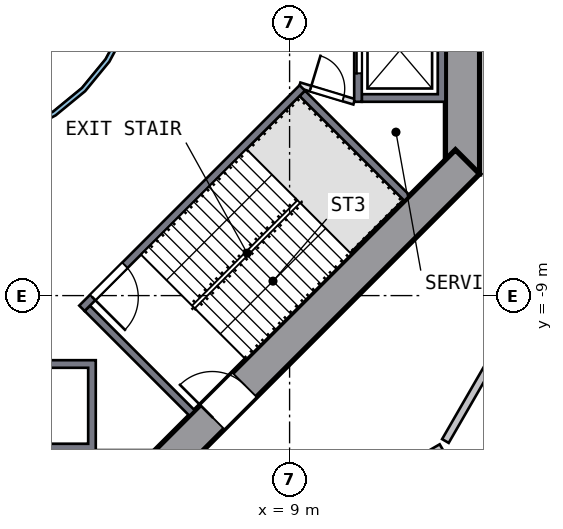
"""IFC4 building model, lengths in metres.
Left out: names, types, materials, properties, quantities, classifications, styles, units other than length and angle.
Written with IfcOpenShell. Run it as: python <this file> out.ifc"""

import sys

from ifc_helpers import new_model, si_unit, direction, frame, frame_2d, origin, place, context, subcontext, project, spatial, polyline, rectangle, outline, extrude, element, fill, save


model = new_model("IFC4")
c1 = context("Model", 3, precision=1e-05, world=origin(), true_north=direction((0.0, 1.0)))
c2 = subcontext(c1, "Body", "Model", "MODEL_VIEW")
j1 = project(units=[si_unit("LENGTHUNIT", "METRE"), si_unit("PLANEANGLEUNIT", "RADIAN")], contexts=[c1])
p1 = place(None, origin())
s1 = spatial("IfcSite", under=j1, at=p1, CompositionType="ELEMENT")
p2 = place(p1, origin())
s2 = spatial("IfcBuilding", under=s1, at=p2, CompositionType="ELEMENT")
p3 = place(p2, frame((0.0, 0.0, 34.0)))
s3 = spatial("IfcBuildingStorey", under=s2, at=p3, CompositionType="ELEMENT", Elevation=34.0)
p4 = place(p3, frame((13.55, -5.799, 0.0), z_axis=(0.0, 0.0, 1.0), x_axis=(0.0, 1.0, 0.0)))
e1 = element("IfcWall", 1, at=p4, inside=s3, PredefinedType="SHEAR", context=c2, shape_type="SweptSolid", body=[
    extrude(rectangle(XDim=11.598, YDim=0.9, at=frame_2d((5.799, 0.0))), origin(), (0.0, 0.0, 1.0), 5.0),
])
p5 = place(p4, frame((4.899, 0.0, 0.0)))
e2 = element("IfcOpeningElement", 2, at=p5, cuts=e1, PredefinedType="OPENING", context=c2, shape_type="SweptSolid", body=[
    extrude(rectangle(XDim=1.8, YDim=2.1, at=frame_2d((0.9, 1.05))), frame((0.0, 0.46, 0.0), z_axis=(0.0, -1.0, 0.0), x_axis=(1.0, 0.0, 0.0)), (0.0, 0.0, 1.0), 0.92),
])
p6 = place(p3, frame((5.481, -13.682, 0.0), z_axis=(0.0, 0.0, 1.0), x_axis=(0.707106781, 0.707106781, 0.0)))
e3 = element("IfcWall", 3, at=p6, inside=s3, PredefinedType="SHEAR", context=c2, shape_type="SweptSolid", body=[
    extrude(rectangle(XDim=11.598, YDim=0.9, at=frame_2d((5.799, 0.0))), origin(), (0.0, 0.0, 1.0), 5.0),
])
p7 = place(p6, frame((2.099, 0.0, 0.0)))
e4 = element("IfcOpeningElement", 4, at=p7, cuts=e3, PredefinedType="OPENING", context=c2, shape_type="SweptSolid", body=[
    extrude(rectangle(XDim=1.2, YDim=2.1, at=frame_2d((0.6, 1.05))), frame((0.0, 0.46, 0.0), z_axis=(0.0, -1.0, 0.0), x_axis=(1.0, 0.0, 0.0)), (0.0, 0.0, 1.0), 0.92),
])
p8 = place(p3, origin())
e5 = element("IfcWall", 5, at=p8, inside=s3, PredefinedType="SOLIDWALL", context=c2, shape_type="SweptSolid", body=[
    extrude(outline(polyline([(13.1, -3.9), (10.9, -3.9), (10.9, -3.7), (12.9, -3.7), (12.9, -1.4), (10.9, -1.4), (10.9, -1.2), (13.1, -1.2), (13.1, -3.9)])), origin(), (0.0, 0.0, 1.0), 4.69),
])
p9 = place(p3, frame((10.8, -1.2, 0.0), z_axis=(0.0, 0.0, 1.0), x_axis=(0.0, -1.0, 0.0)))
e6 = element("IfcWall", 6, at=p9, inside=s3, PredefinedType="SOLIDWALL", context=c2, shape_type="SweptSolid", body=[
    extrude(rectangle(XDim=2.7, YDim=0.2, at=frame_2d((1.35, 0.0))), origin(), (0.0, 0.0, 1.0), 4.69),
])
p10 = place(p9, frame((0.75, 0.0, 0.0)))
e7 = element("IfcOpeningElement", 7, at=p10, cuts=e6, PredefinedType="OPENING", context=c2, shape_type="SweptSolid", body=[
    extrude(rectangle(XDim=1.2, YDim=2.1, at=frame_2d((0.6, 1.05))), frame((0.0, 0.11, 0.0), z_axis=(0.0, -1.0, 0.0), x_axis=(1.0, 0.0, 0.0)), (0.0, 0.0, 1.0), 0.22),
])
p11 = place(p3, origin())
e8 = element("IfcWall", 8, at=p11, inside=s3, PredefinedType="SOLIDWALL", context=c2, shape_type="SweptSolid", body=[
    extrude(outline(polyline([(3.9, -10.7), (3.9, -13.1), (1.2, -13.1), (1.2, -10.7), (3.9, -10.7)]), holes=[polyline([(1.4, -12.9), (3.7, -12.9), (3.7, -10.9), (1.4, -10.9), (1.4, -12.9)])]), origin(), (0.0, 0.0, 1.0), 4.69),
])
p12 = place(p3, frame((9.334, -3.535, 0.0), z_axis=(0.0, 0.0, 1.0), x_axis=(-0.707106781, -0.707106781, 0.0)))
e9 = element("IfcWall", 9, at=p12, inside=s3, PredefinedType="SOLIDWALL", context=c2, shape_type="SweptSolid", body=[
    extrude(rectangle(XDim=8.2, YDim=0.2, at=frame_2d((4.1, 0.0))), origin(), (0.0, 0.0, 1.0), 4.69),
])
p13 = place(p12, frame((6.6, 0.0, 0.0)))
e10 = element("IfcOpeningElement", 10, at=p13, cuts=e9, PredefinedType="OPENING", context=c2, shape_type="SweptSolid", body=[
    extrude(rectangle(XDim=1.2, YDim=2.1, at=frame_2d((0.6, 1.05))), frame((0.0, 0.11, 0.0), z_axis=(0.0, -1.0, 0.0), x_axis=(1.0, 0.0, 0.0)), (0.0, 0.0, 1.0), 0.22),
])
for number, where, z_axis, x_axis in (
    (11, (3.677, -9.334, 0.0), (0.0, 0.0, 1.0), (0.707, -0.707, 0.0)),
    (12, (9.334, -3.677, 0.0), (0.0, 0.0, 1.0), (0.707, -0.707, 0.0)),
):
    element("IfcWall", number, at=place(p3, frame(where, z_axis=z_axis, x_axis=x_axis)), inside=s3, PredefinedType="SOLIDWALL", context=c2, shape_type="SweptSolid", body=[
        extrude(rectangle(XDim=3.9, YDim=0.2, at=frame_2d((1.95, 0.0))), origin(), (0.0, 0.0, 1.0), 4.69),
    ])
p14 = place(p3, frame((9.263, -3.465, 0.0), z_axis=(0.0, 0.0, 1.0), x_axis=(0.957084567, -0.289808785, 0.0)))
e13 = element("IfcWall", 13, at=p14, inside=s3, PredefinedType="PARTITIONING", context=c2, shape_type="SweptSolid", body=[
    extrude(rectangle(XDim=1.501, YDim=0.15, at=frame_2d((0.75, 0.0))), origin(), (0.0, 0.0, 1.0), 4.69),
])
p15 = place(p14, frame((0.301, 0.0, 0.0)))
e14 = element("IfcOpeningElement", 14, at=p15, cuts=e13, PredefinedType="OPENING", context=c2, shape_type="SweptSolid", body=[
    extrude(rectangle(XDim=0.9, YDim=2.1, at=frame_2d((0.45, 1.05))), frame((0.0, 0.085, 0.0), z_axis=(0.0, -1.0, 0.0), x_axis=(1.0, 0.0, 0.0)), (0.0, 0.0, 1.0), 0.17),
])
p16 = place(p3, origin())
e15 = element("IfcWall", 15, at=p16, inside=s3, PredefinedType="SOLIDWALL", context=c2, shape_type="SweptSolid", body=[
    extrude(outline(polyline([(5.021, -0.999), (4.73, -1.959), (4.257, -2.844), (3.62, -3.62), (2.844, -4.257), (1.959, -4.73), (0.999, -5.021), (0.0, -5.12), (-0.999, -5.021), (-1.959, -4.73), (-2.844, -4.257), (-3.62, -3.62), (-4.257, -2.844), (-4.73, -1.959), (-5.021, -0.999), (-5.12, 0.0), (-5.021, 0.999), (-4.73, 1.959), (-4.257, 2.844), (-3.62, 3.62), (-2.844, 4.257), (-1.959, 4.73), (-0.999, 5.021), (0.0, 5.12), (0.999, 5.021), (1.959, 4.73), (2.844, 4.257), (3.62, 3.62), (4.257, 2.844), (4.73, 1.959), (5.021, 0.999), (5.12, 0.0), (5.021, -0.999)]), holes=[polyline([(4.904, 0.976), (4.619, 1.913), (4.157, 2.778), (3.535, 3.535), (2.778, 4.157), (1.913, 4.619), (0.976, 4.904), (0.0, 5.0), (-0.976, 4.904), (-1.913, 4.619), (-2.778, 4.157), (-3.535, 3.535), (-4.157, 2.778), (-4.619, 1.913), (-4.904, 0.976), (-5.0, 0.0), (-4.904, -0.976), (-4.619, -1.913), (-4.157, -2.778), (-3.535, -3.535), (-2.778, -4.157), (-1.913, -4.619), (-0.976, -4.904), (0.0, -5.0), (0.976, -4.904), (1.913, -4.619), (2.778, -4.157), (3.535, -3.535), (4.157, -2.778), (4.619, -1.913), (4.904, -0.976), (5.0, 0.0), (4.904, 0.976)])]), origin(), (0.0, 0.0, 1.0), 4.69),
])
p17 = place(p3, frame((13.0, -13.0, 0.0), z_axis=(0.0, 0.0, 1.0), x_axis=(-0.866021935, -0.500006007, 0.0)))
e16 = element("IfcWall", 16, at=p17, inside=s3, PredefinedType="SOLIDWALL", context=c2, shape_type="SweptSolid", body=[
    extrude(rectangle(XDim=9.316, YDim=0.2, at=frame_2d((4.658, 0.0))), origin(), (0.0, 0.0, 1.0), 4.69),
])
p18 = place(p17, frame((1.9, 0.0, 0.0)))
e17 = element("IfcOpeningElement", 17, at=p18, cuts=e16, PredefinedType="OPENING", context=c2, shape_type="SweptSolid", body=[
    extrude(rectangle(XDim=1.0, YDim=2.1, at=frame_2d((0.5, 1.05))), frame((0.0, 0.11, 0.0), z_axis=(0.0, -1.0, 0.0), x_axis=(1.0, 0.0, 0.0)), (0.0, 0.0, 1.0), 0.22),
])
p19 = place(p3, frame((13.1, -12.827, 0.0), z_axis=(0.0, 0.0, 1.0), x_axis=(0.499910548, 0.866077043, 0.0)))
e18 = element("IfcWall", 18, at=p19, inside=s3, PredefinedType="SOLIDWALL", context=c2, shape_type="SweptSolid", body=[
    extrude(rectangle(XDim=3.258, YDim=0.2, at=frame_2d((1.629, 0.0))), origin(), (0.0, 0.0, 1.0), 4.69),
])
p20 = place(p10, origin())
e19 = element("IfcDoor", 19, at=p20, inside=s3, OperationType="DOUBLE_DOOR_SLIDING", PredefinedType="DOOR", context=c2, shape_type="SweptSolid", body=[
    extrude(rectangle(XDim=1.2, YDim=2.1, at=frame_2d((0.6, 1.05))), frame((0.0, 0.025, 0.0), z_axis=(0.0, -1.0, 0.0), x_axis=(1.0, 0.0, 0.0)), (0.0, 0.0, 1.0), 0.05),
])
fill(e7, e19)
p21 = place(p13, origin())
e20 = element("IfcDoor", 20, at=p21, inside=s3, OperationType="SINGLE_SWING_RIGHT", PredefinedType="DOOR", context=c2, shape_type="SweptSolid", body=[
    extrude(rectangle(XDim=1.2, YDim=2.1, at=frame_2d((0.6, 1.05))), frame((0.0, 0.025, 0.0), z_axis=(0.0, -1.0, 0.0), x_axis=(1.0, 0.0, 0.0)), (0.0, 0.0, 1.0), 0.05),
])
fill(e10, e20)
p22 = place(p7, origin())
e21 = element("IfcDoor", 21, at=p22, inside=s3, OperationType="SINGLE_SWING_LEFT", PredefinedType="DOOR", context=c2, shape_type="SweptSolid", body=[
    extrude(rectangle(XDim=1.2, YDim=2.1, at=frame_2d((0.6, 1.05))), frame((0.0, 0.025, 0.0), z_axis=(0.0, -1.0, 0.0), x_axis=(1.0, 0.0, 0.0)), (0.0, 0.0, 1.0), 0.05),
])
fill(e4, e21)
p23 = place(p15, origin())
e22 = element("IfcDoor", 22, at=p23, inside=s3, OperationType="SINGLE_SWING_LEFT", PredefinedType="DOOR", context=c2, shape_type="SweptSolid", body=[
    extrude(rectangle(XDim=0.9, YDim=2.1, at=frame_2d((0.45, 1.05))), frame((0.0, 0.025, 0.0), z_axis=(0.0, -1.0, 0.0), x_axis=(1.0, 0.0, 0.0)), (0.0, 0.0, 1.0), 0.05),
])
fill(e14, e22)
save(model, sys.argv[1])
